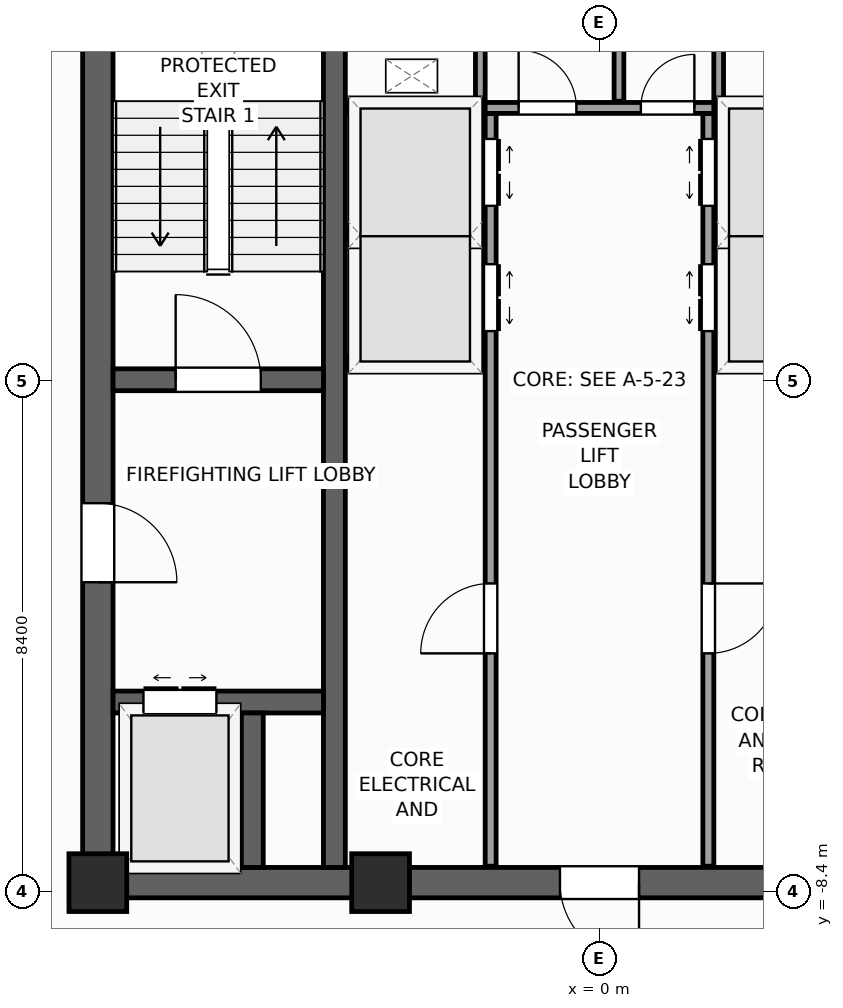
"""IFC4 building model, lengths in metres.
Left out: names, types, materials, properties, quantities, classifications, styles, units other than length and angle.
Written with IfcOpenShell. Run it as: python <this file> out.ifc"""

import sys

from ifc_helpers import new_model, si_unit, direction, frame, frame_2d, origin, origin_2d, place, context, subcontext, project, spatial, rectangle, extrude, source, transform, mapped, element, fill, save


model = new_model("IFC4")
c1 = context("Model", 3, precision=1e-05, world=origin(), true_north=direction((0.0, 1.0)))
c2 = subcontext(c1, "Body", "Model", "MODEL_VIEW")
j1 = project(units=[si_unit("LENGTHUNIT", "METRE"), si_unit("PLANEANGLEUNIT", "RADIAN")], contexts=[c1])
p1 = place(None, origin())
s1 = spatial("IfcSite", under=j1, at=p1, CompositionType="ELEMENT")
p2 = place(p1, origin())
s2 = spatial("IfcBuilding", under=s1, at=p2, CompositionType="ELEMENT")
p3 = place(p2, frame((0.0, 0.0, 236.8)))
s3 = spatial("IfcBuildingStorey", under=s2, at=p3, CompositionType="ELEMENT", Elevation=236.8)
p4 = place(p3, frame((-8.5, -8.25, 0.0), z_axis=(0.0, 0.0, 1.0), x_axis=(1.0, 0.0, 0.0)))
e1 = element("IfcWall", 1, at=p4, inside=s3, PredefinedType="SHEAR", context=c2, shape_type="SweptSolid", body=[
    extrude(rectangle(XDim=17.0, YDim=0.5, at=frame_2d((8.5, 0.0))), origin(), (0.0, 0.0, 1.0), 3.9),
])
p5 = place(p4, frame((7.85, 0.0, 0.0)))
e2 = element("IfcOpeningElement", 2, at=p5, cuts=e1, PredefinedType="OPENING", context=c2, shape_type="SweptSolid", body=[
    extrude(rectangle(XDim=1.3, YDim=2.2, at=frame_2d((0.65, 1.1))), frame((0.0, 0.26, 0.0), z_axis=(0.0, -1.0, 0.0), x_axis=(1.0, 0.0, 0.0)), (0.0, 0.0, 1.0), 0.52),
])
p6 = place(p3, frame((-8.25, -8.0, 0.0), z_axis=(0.0, 0.0, 1.0), x_axis=(0.0, 1.0, 0.0)))
e3 = element("IfcWall", 3, at=p6, inside=s3, PredefinedType="SHEAR", context=c2, shape_type="SweptSolid", body=[
    extrude(rectangle(XDim=16.0, YDim=0.5, at=frame_2d((8.0, 0.0))), origin(), (0.0, 0.0, 1.0), 3.9),
])
p7 = place(p6, frame((4.69, 0.0, 0.0)))
e4 = element("IfcOpeningElement", 4, at=p7, cuts=e3, PredefinedType="OPENING", context=c2, shape_type="SweptSolid", body=[
    extrude(rectangle(XDim=1.3, YDim=2.2, at=frame_2d((0.65, 1.1))), frame((0.0, 0.26, 0.0), z_axis=(0.0, -1.0, 0.0), x_axis=(1.0, 0.0, 0.0)), (0.0, 0.0, 1.0), 0.52),
])
p8 = place(p3, frame((-4.36, -8.0, 0.0), z_axis=(0.0, 0.0, 1.0), x_axis=(0.0, 1.0, 0.0)))
e5 = element("IfcWall", 5, at=p8, inside=s3, PredefinedType="SHEAR", context=c2, shape_type="SweptSolid", body=[
    extrude(rectangle(XDim=16.0, YDim=0.36, at=frame_2d((8.0, 0.0))), origin(), (0.0, 0.0, 1.0), 3.9),
])
p9 = place(p3, frame((-8.0, 0.02, 0.0), z_axis=(0.0, 0.0, 1.0), x_axis=(1.0, 0.0, 0.0)))
e6 = element("IfcWall", 6, at=p9, inside=s3, PredefinedType="SHEAR", context=c2, shape_type="SweptSolid", body=[
    extrude(rectangle(XDim=3.46, YDim=0.36, at=frame_2d((1.73, 0.0))), origin(), (0.0, 0.0, 1.0), 3.9),
])
p10 = place(p9, frame((1.03, 0.0, 0.0)))
e7 = element("IfcOpeningElement", 7, at=p10, cuts=e6, PredefinedType="OPENING", context=c2, shape_type="SweptSolid", body=[
    extrude(rectangle(XDim=1.4, YDim=2.2, at=frame_2d((0.7, 1.1))), frame((0.0, 0.19, 0.0), z_axis=(0.0, -1.0, 0.0), x_axis=(1.0, 0.0, 0.0)), (0.0, 0.0, 1.0), 0.38),
])
p11 = place(p3, frame((-8.0, -5.28, 0.0), z_axis=(0.0, 0.0, 1.0), x_axis=(1.0, 0.0, 0.0)))
e8 = element("IfcWall", 8, at=p11, inside=s3, PredefinedType="SHEAR", context=c2, shape_type="SweptSolid", body=[
    extrude(rectangle(XDim=3.46, YDim=0.36, at=frame_2d((1.73, 0.0))), origin(), (0.0, 0.0, 1.0), 3.9),
])
p12 = place(p11, frame((0.5, 0.0, 0.0)))
e9 = element("IfcOpeningElement", 9, at=p12, cuts=e8, PredefinedType="OPENING", context=c2, shape_type="SweptSolid", body=[
    extrude(rectangle(XDim=1.2, YDim=2.25, at=frame_2d((0.6, 1.125))), frame((0.0, 0.19, 0.0), z_axis=(0.0, -1.0, 0.0), x_axis=(1.0, 0.0, 0.0)), (0.0, 0.0, 1.0), 0.38),
])
p13 = place(p3, frame((-5.71, -8.0, 0.0), z_axis=(0.0, 0.0, 1.0), x_axis=(0.0, 1.0, 0.0)))
e10 = element("IfcWall", 10, at=p13, inside=s3, PredefinedType="SHEAR", context=c2, shape_type="SweptSolid", body=[
    extrude(rectangle(XDim=2.54, YDim=0.36, at=frame_2d((1.27, 0.0))), origin(), (0.0, 0.0, 1.0), 3.9),
])
m1 = source(origin(), c2, "Body", "SweptSolid", [
    extrude(rectangle(XDim=0.95, YDim=0.95, at=origin_2d()), origin(), (0.0, 0.0, 1.0), 3.9),
])
for number, where, z_axis, x_axis in (
    (11, (-8.25, -8.25, 0.0), (0.0, 0.0, 1.0), (1.0, 0.0, 0.0)),
    (12, (-3.6, -8.25, 0.0), (0.0, 0.0, 1.0), (1.0, 0.0, 0.0)),
):
    element("IfcColumn", number, at=place(p3, frame(where, z_axis=z_axis, x_axis=x_axis)), inside=s3, PredefinedType="PILASTER", context=c2, shape_type="MappedRepresentation", body=[
        mapped(m1, transform((0.0, 0.0, 0.0), scale=1.0)),
    ])
p14 = place(p3, frame((-6.733, 29.154, 0.0), z_axis=(0.0, 0.0, 1.0), x_axis=(-0.629325378072, -0.77714192302, 0.0)))
e13 = element("IfcWall", 13, at=p14, inside=s3, PredefinedType="STANDARD", context=c2, shape_type="SweptSolid", body=[
    extrude(rectangle(XDim=36.84, YDim=0.34, at=frame_2d((18.42, 0.0))), origin(), (0.0, 0.0, 1.0), 2.96),
])
p15 = place(p14, frame((12.295, 0.0, 0.0)))
e14 = element("IfcOpeningElement", 14, at=p15, cuts=e13, PredefinedType="OPENING", context=c2, shape_type="SweptSolid", body=[
    extrude(rectangle(XDim=1.05, YDim=2.25, at=frame_2d((0.525, 1.125))), frame((0.0, 0.18, 0.0), z_axis=(0.0, -1.0, 0.0), x_axis=(1.0, 0.0, 0.0)), (0.0, 0.0, 1.0), 0.36),
])
p16 = place(p14, frame((3.721, 0.0, 0.48)))
e15 = element("IfcOpeningElement", 15, at=p16, cuts=e13, PredefinedType="OPENING", context=c2, shape_type="SweptSolid", body=[
    extrude(rectangle(XDim=1.4, YDim=2.4, at=frame_2d((0.7, 1.2))), frame((0.0, 0.18, 0.0), z_axis=(0.0, -1.0, 0.0), x_axis=(1.0, 0.0, 0.0)), (0.0, 0.0, 1.0), 0.36),
])
p17 = place(p14, frame((7.559, 0.0, 0.58)))
e16 = element("IfcOpeningElement", 16, at=p17, cuts=e13, PredefinedType="OPENING", context=c2, shape_type="SweptSolid", body=[
    extrude(rectangle(XDim=1.75, YDim=2.3, at=frame_2d((0.875, 1.15))), frame((0.0, 0.18, 0.0), z_axis=(0.0, -1.0, 0.0), x_axis=(1.0, 0.0, 0.0)), (0.0, 0.0, 1.0), 0.36),
])
p18 = place(p14, frame((16.058, 0.0, 0.58)))
e17 = element("IfcOpeningElement", 17, at=p18, cuts=e13, PredefinedType="OPENING", context=c2, shape_type="SweptSolid", body=[
    extrude(rectangle(XDim=1.75, YDim=2.3, at=frame_2d((0.875, 1.15))), frame((0.0, 0.18, 0.0), z_axis=(0.0, -1.0, 0.0), x_axis=(1.0, 0.0, 0.0)), (0.0, 0.0, 1.0), 0.36),
])
p19 = place(p14, frame((24.176, 0.0, 0.58)))
e18 = element("IfcOpeningElement", 18, at=p19, cuts=e13, PredefinedType="OPENING", context=c2, shape_type="SweptSolid", body=[
    extrude(rectangle(XDim=1.75, YDim=2.3, at=frame_2d((0.875, 1.15))), frame((0.0, 0.18, 0.0), z_axis=(0.0, -1.0, 0.0), x_axis=(1.0, 0.0, 0.0)), (0.0, 0.0, 1.0), 0.36),
])
p20 = place(p14, frame((30.982, 0.0, 0.48)))
e19 = element("IfcOpeningElement", 19, at=p20, cuts=e13, PredefinedType="OPENING", context=c2, shape_type="SweptSolid", body=[
    extrude(rectangle(XDim=1.4, YDim=2.4, at=frame_2d((0.7, 1.2))), frame((0.0, 0.18, 0.0), z_axis=(0.0, -1.0, 0.0), x_axis=(1.0, 0.0, 0.0)), (0.0, 0.0, 1.0), 0.36),
])
p21 = place(p3, frame((-29.154, -6.733, 0.0), z_axis=(0.0, 0.0, 1.0), x_axis=(0.77714192302, -0.629325378072, 0.0)))
e20 = element("IfcWall", 20, at=p21, inside=s3, PredefinedType="STANDARD", context=c2, shape_type="SweptSolid", body=[
    extrude(rectangle(XDim=36.84, YDim=0.34, at=frame_2d((18.42, 0.0))), origin(), (0.0, 0.0, 1.0), 2.96),
])
p22 = place(p21, frame((3.721, 0.0, 0.48)))
e21 = element("IfcOpeningElement", 21, at=p22, cuts=e20, PredefinedType="OPENING", context=c2, shape_type="SweptSolid", body=[
    extrude(rectangle(XDim=1.4, YDim=2.4, at=frame_2d((0.7, 1.2))), frame((0.0, 0.18, 0.0), z_axis=(0.0, -1.0, 0.0), x_axis=(1.0, 0.0, 0.0)), (0.0, 0.0, 1.0), 0.36),
])
p23 = place(p21, frame((9.809, 0.0, 0.58)))
e22 = element("IfcOpeningElement", 22, at=p23, cuts=e20, PredefinedType="OPENING", context=c2, shape_type="SweptSolid", body=[
    extrude(rectangle(XDim=1.75, YDim=2.3, at=frame_2d((0.875, 1.15))), frame((0.0, 0.18, 0.0), z_axis=(0.0, -1.0, 0.0), x_axis=(1.0, 0.0, 0.0)), (0.0, 0.0, 1.0), 0.36),
])
p24 = place(p21, frame((16.058, 0.0, 0.58)))
e23 = element("IfcOpeningElement", 23, at=p24, cuts=e20, PredefinedType="OPENING", context=c2, shape_type="SweptSolid", body=[
    extrude(rectangle(XDim=1.75, YDim=2.3, at=frame_2d((0.875, 1.15))), frame((0.0, 0.18, 0.0), z_axis=(0.0, -1.0, 0.0), x_axis=(1.0, 0.0, 0.0)), (0.0, 0.0, 1.0), 0.36),
])
p25 = place(p21, frame((24.176, 0.0, 0.58)))
e24 = element("IfcOpeningElement", 24, at=p25, cuts=e20, PredefinedType="OPENING", context=c2, shape_type="SweptSolid", body=[
    extrude(rectangle(XDim=1.75, YDim=2.3, at=frame_2d((0.875, 1.15))), frame((0.0, 0.18, 0.0), z_axis=(0.0, -1.0, 0.0), x_axis=(1.0, 0.0, 0.0)), (0.0, 0.0, 1.0), 0.36),
])
p26 = place(p21, frame((32.482, 0.0, 0.48)))
e25 = element("IfcOpeningElement", 25, at=p26, cuts=e20, PredefinedType="OPENING", context=c2, shape_type="SweptSolid", body=[
    extrude(rectangle(XDim=1.4, YDim=2.4, at=frame_2d((0.7, 1.2))), frame((0.0, 0.18, 0.0), z_axis=(0.0, -1.0, 0.0), x_axis=(1.0, 0.0, 0.0)), (0.0, 0.0, 1.0), 0.36),
])
p27 = place(p3, frame((-1.79, -7.98, 0.0), z_axis=(0.0, 0.0, 1.0), x_axis=(0.0, 1.0, 0.0)))
e26 = element("IfcWall", 26, at=p27, inside=s3, PredefinedType="PARTITIONING", context=c2, shape_type="SweptSolid", body=[
    extrude(rectangle(XDim=12.38, YDim=0.18, at=frame_2d((6.19, 0.0))), origin(), (0.0, 0.0, 1.0), 3.66),
])
p28 = place(p27, frame((8.8, 0.0, 0.0)))
e27 = element("IfcOpeningElement", 27, at=p28, cuts=e26, PredefinedType="OPENING", context=c2, shape_type="SweptSolid", body=[
    extrude(rectangle(XDim=1.1, YDim=2.2, at=frame_2d((0.55, 1.1))), frame((0.0, 0.1, 0.0), z_axis=(0.0, -1.0, 0.0), x_axis=(1.0, 0.0, 0.0)), (0.0, 0.0, 1.0), 0.2),
])
p29 = place(p27, frame((10.86, 0.0, 0.0)))
e28 = element("IfcOpeningElement", 28, at=p29, cuts=e26, PredefinedType="OPENING", context=c2, shape_type="SweptSolid", body=[
    extrude(rectangle(XDim=1.1, YDim=2.2, at=frame_2d((0.55, 1.1))), frame((0.0, 0.1, 0.0), z_axis=(0.0, -1.0, 0.0), x_axis=(1.0, 0.0, 0.0)), (0.0, 0.0, 1.0), 0.2),
])
p30 = place(p27, frame((3.5, 0.0, 0.0)))
e29 = element("IfcOpeningElement", 29, at=p30, cuts=e26, PredefinedType="OPENING", context=c2, shape_type="SweptSolid", body=[
    extrude(rectangle(XDim=1.15, YDim=2.25, at=frame_2d((0.575, 1.125))), frame((0.0, 0.1, 0.0), z_axis=(0.0, -1.0, 0.0), x_axis=(1.0, 0.0, 0.0)), (0.0, 0.0, 1.0), 0.2),
])
p31 = place(p3, frame((1.79, -7.98, 0.0), z_axis=(0.0, 0.0, 1.0), x_axis=(0.0, 1.0, 0.0)))
e30 = element("IfcWall", 30, at=p31, inside=s3, PredefinedType="PARTITIONING", context=c2, shape_type="SweptSolid", body=[
    extrude(rectangle(XDim=12.38, YDim=0.18, at=frame_2d((6.19, 0.0))), origin(), (0.0, 0.0, 1.0), 3.66),
])
p32 = place(p31, frame((8.8, 0.0, 0.0)))
e31 = element("IfcOpeningElement", 31, at=p32, cuts=e30, PredefinedType="OPENING", context=c2, shape_type="SweptSolid", body=[
    extrude(rectangle(XDim=1.1, YDim=2.2, at=frame_2d((0.55, 1.1))), frame((0.0, 0.1, 0.0), z_axis=(0.0, -1.0, 0.0), x_axis=(1.0, 0.0, 0.0)), (0.0, 0.0, 1.0), 0.2),
])
p33 = place(p31, frame((10.86, 0.0, 0.0)))
e32 = element("IfcOpeningElement", 32, at=p33, cuts=e30, PredefinedType="OPENING", context=c2, shape_type="SweptSolid", body=[
    extrude(rectangle(XDim=1.1, YDim=2.2, at=frame_2d((0.55, 1.1))), frame((0.0, 0.1, 0.0), z_axis=(0.0, -1.0, 0.0), x_axis=(1.0, 0.0, 0.0)), (0.0, 0.0, 1.0), 0.2),
])
p34 = place(p31, frame((3.5, 0.0, 0.0)))
e33 = element("IfcOpeningElement", 33, at=p34, cuts=e30, PredefinedType="OPENING", context=c2, shape_type="SweptSolid", body=[
    extrude(rectangle(XDim=1.15, YDim=2.25, at=frame_2d((0.575, 1.125))), frame((0.0, 0.1, 0.0), z_axis=(0.0, -1.0, 0.0), x_axis=(1.0, 0.0, 0.0)), (0.0, 0.0, 1.0), 0.2),
])
p35 = place(p3, frame((-1.88, 4.49, 0.0), z_axis=(0.0, 0.0, 1.0), x_axis=(1.0, 0.0, 0.0)))
e34 = element("IfcWall", 34, at=p35, inside=s3, PredefinedType="PARTITIONING", context=c2, shape_type="SweptSolid", body=[
    extrude(rectangle(XDim=3.76, YDim=0.18, at=frame_2d((1.88, 0.0))), origin(), (0.0, 0.0, 1.0), 3.66),
])
p36 = place(p35, frame((0.55, 0.0, 0.0)))
e35 = element("IfcOpeningElement", 35, at=p36, cuts=e34, PredefinedType="OPENING", context=c2, shape_type="SweptSolid", body=[
    extrude(rectangle(XDim=0.95, YDim=2.1, at=frame_2d((0.475, 1.05))), frame((0.0, 0.1, 0.0), z_axis=(0.0, -1.0, 0.0), x_axis=(1.0, 0.0, 0.0)), (0.0, 0.0, 1.0), 0.2),
])
p37 = place(p35, frame((2.56, 0.0, 0.0)))
e36 = element("IfcOpeningElement", 36, at=p37, cuts=e34, PredefinedType="OPENING", context=c2, shape_type="SweptSolid", body=[
    extrude(rectangle(XDim=0.88, YDim=2.1, at=frame_2d((0.44, 1.05))), frame((0.0, 0.1, 0.0), z_axis=(0.0, -1.0, 0.0), x_axis=(1.0, 0.0, 0.0)), (0.0, 0.0, 1.0), 0.2),
])
for number, where, z_axis, x_axis in (
    (37, (-4.17, 0.3, 0.0), (0.0, 0.0, 1.0), (1.0, 0.0, 0.0)),
    (38, (1.89, 0.3, 0.0), (0.0, 0.0, 1.0), (1.0, 0.0, 0.0)),
    (39, (-4.17, 4.49, 0.0), (0.0, 0.0, 1.0), (1.0, 0.0, 0.0)),
    (40, (1.89, 4.49, 0.0), (0.0, 0.0, 1.0), (1.0, 0.0, 0.0)),
):
    element("IfcWall", number, at=place(p3, frame(where, z_axis=z_axis, x_axis=x_axis)), inside=s3, PredefinedType="PARTITIONING", context=c2, shape_type="SweptSolid", body=[
        extrude(rectangle(XDim=2.28, YDim=0.18, at=frame_2d((1.14, 0.0))), origin(), (0.0, 0.0, 1.0), 3.66),
    ])
for number, where, z_axis, x_axis in (
    (41, (-4.16, 2.4, 0.0), (0.0, 0.0, 1.0), (1.0, 0.0, 0.0)),
    (42, (1.9, 2.4, 0.0), (0.0, 0.0, 1.0), (1.0, 0.0, 0.0)),
):
    element("IfcWall", number, at=place(p3, frame(where, z_axis=z_axis, x_axis=x_axis)), inside=s3, PredefinedType="PARTITIONING", context=c2, shape_type="SweptSolid", body=[
        extrude(rectangle(XDim=2.26, YDim=0.12, at=frame_2d((1.13, 0.0))), origin(), (0.0, 0.0, 1.0), 3.66),
    ])
for number, where, z_axis, x_axis in (
    (43, (-1.96, 4.58, 0.0), (0.0, 0.0, 1.0), (0.0, 1.0, 0.0)),
    (44, (1.96, 4.58, 0.0), (0.0, 0.0, 1.0), (0.0, 1.0, 0.0)),
):
    element("IfcWall", number, at=place(p3, frame(where, z_axis=z_axis, x_axis=x_axis)), inside=s3, PredefinedType="PARTITIONING", context=c2, shape_type="SweptSolid", body=[
        extrude(rectangle(XDim=3.4, YDim=0.16, at=frame_2d((1.7, 0.0))), origin(), (0.0, 0.0, 1.0), 3.66),
    ])
p38 = place(p3, frame((0.32, 4.6, 0.0), z_axis=(0.0, 0.0, 1.0), x_axis=(0.0, 1.0, 0.0)))
e45 = element("IfcWall", 45, at=p38, inside=s3, PredefinedType="PARTITIONING", context=c2, shape_type="SweptSolid", body=[
    extrude(rectangle(XDim=1.95, YDim=0.16, at=frame_2d((0.975, 0.0))), origin(), (0.0, 0.0, 1.0), 3.66),
])
m2 = source(origin(), c2, "Body", "SweptSolid", [
    extrude(rectangle(XDim=1.4, YDim=2.2, at=frame_2d((0.7, 1.1))), frame((0.0, 0.025, 0.0), z_axis=(0.0, -1.0, 0.0), x_axis=(1.0, 0.0, 0.0)), (0.0, 0.0, 1.0), 0.05),
])
p39 = place(p10, origin())
e46 = element("IfcDoor", 46, at=p39, inside=s3, OperationType="SINGLE_SWING_LEFT", PredefinedType="DOOR", context=c2, shape_type="MappedRepresentation", body=[
    mapped(m2, transform((0.0, 0.0, 0.0), scale=1.0)),
])
fill(e7, e46)
m3 = source(origin(), c2, "Body", "SweptSolid", [
    extrude(rectangle(XDim=1.3, YDim=2.2, at=frame_2d((0.65, 1.1))), frame((0.0, 0.025, 0.0), z_axis=(0.0, -1.0, 0.0), x_axis=(1.0, 0.0, 0.0)), (0.0, 0.0, 1.0), 0.05),
])
p40 = place(p7, frame((1.3, 0.0, 0.0), z_axis=(0.0, 0.0, 1.0), x_axis=(-1.0, 0.0, 0.0)))
e47 = element("IfcDoor", 47, at=p40, inside=s3, OperationType="SINGLE_SWING_LEFT", PredefinedType="DOOR", context=c2, shape_type="MappedRepresentation", body=[
    mapped(m3, transform((0.0, 0.0, 0.0), scale=1.0)),
])
fill(e4, e47)
p41 = place(p5, frame((1.3, 0.0, 0.0), z_axis=(0.0, 0.0, 1.0), x_axis=(-1.0, 0.0, 0.0)))
e48 = element("IfcDoor", 48, at=p41, inside=s3, OperationType="SINGLE_SWING_RIGHT", PredefinedType="DOOR", context=c2, shape_type="MappedRepresentation", body=[
    mapped(m3, transform((0.0, 0.0, 0.0), scale=1.0)),
])
fill(e2, e48)
m4 = source(origin(), c2, "Body", "SweptSolid", [
    extrude(rectangle(XDim=1.2, YDim=2.25, at=frame_2d((0.6, 1.125))), frame((0.0, 0.025, 0.0), z_axis=(0.0, -1.0, 0.0), x_axis=(1.0, 0.0, 0.0)), (0.0, 0.0, 1.0), 0.05),
])
p42 = place(p12, origin())
e49 = element("IfcDoor", 49, at=p42, inside=s3, OperationType="DOUBLE_DOOR_SLIDING", PredefinedType="DOOR", context=c2, shape_type="MappedRepresentation", body=[
    mapped(m4, transform((0.0, 0.0, 0.0), scale=1.0)),
])
fill(e9, e49)
m5 = source(origin(), c2, "Body", "SweptSolid", [
    extrude(rectangle(XDim=1.1, YDim=2.2, at=frame_2d((0.55, 1.1))), frame((0.0, 0.025, 0.0), z_axis=(0.0, -1.0, 0.0), x_axis=(1.0, 0.0, 0.0)), (0.0, 0.0, 1.0), 0.05),
])
p43 = place(p28, frame((1.1, 0.0, 0.0), z_axis=(0.0, 0.0, 1.0), x_axis=(-1.0, 0.0, 0.0)))
e50 = element("IfcDoor", 50, at=p43, inside=s3, OperationType="DOUBLE_DOOR_SLIDING", PredefinedType="DOOR", context=c2, shape_type="MappedRepresentation", body=[
    mapped(m5, transform((0.0, 0.0, 0.0), scale=1.0)),
])
fill(e27, e50)
p44 = place(p29, frame((1.1, 0.0, 0.0), z_axis=(0.0, 0.0, 1.0), x_axis=(-1.0, 0.0, 0.0)))
e51 = element("IfcDoor", 51, at=p44, inside=s3, OperationType="DOUBLE_DOOR_SLIDING", PredefinedType="DOOR", context=c2, shape_type="MappedRepresentation", body=[
    mapped(m5, transform((0.0, 0.0, 0.0), scale=1.0)),
])
fill(e28, e51)
p45 = place(p32, origin())
e52 = element("IfcDoor", 52, at=p45, inside=s3, OperationType="DOUBLE_DOOR_SLIDING", PredefinedType="DOOR", context=c2, shape_type="MappedRepresentation", body=[
    mapped(m5, transform((0.0, 0.0, 0.0), scale=1.0)),
])
fill(e31, e52)
p46 = place(p33, origin())
e53 = element("IfcDoor", 53, at=p46, inside=s3, OperationType="DOUBLE_DOOR_SLIDING", PredefinedType="DOOR", context=c2, shape_type="MappedRepresentation", body=[
    mapped(m5, transform((0.0, 0.0, 0.0), scale=1.0)),
])
fill(e32, e53)
m6 = source(origin(), c2, "Body", "SweptSolid", [
    extrude(rectangle(XDim=1.15, YDim=2.25, at=frame_2d((0.575, 1.125))), frame((0.0, 0.025, 0.0), z_axis=(0.0, -1.0, 0.0), x_axis=(1.0, 0.0, 0.0)), (0.0, 0.0, 1.0), 0.05),
])
p47 = place(p30, origin())
e54 = element("IfcDoor", 54, at=p47, inside=s3, OperationType="SINGLE_SWING_LEFT", PredefinedType="DOOR", context=c2, shape_type="MappedRepresentation", body=[
    mapped(m6, transform((0.0, 0.0, 0.0), scale=1.0)),
])
fill(e29, e54)
p48 = place(p34, frame((1.15, 0.0, 0.0), z_axis=(0.0, 0.0, 1.0), x_axis=(-1.0, 0.0, 0.0)))
e55 = element("IfcDoor", 55, at=p48, inside=s3, OperationType="SINGLE_SWING_RIGHT", PredefinedType="DOOR", context=c2, shape_type="MappedRepresentation", body=[
    mapped(m6, transform((0.0, 0.0, 0.0), scale=1.0)),
])
fill(e33, e55)
m7 = source(origin(), c2, "Body", "SweptSolid", [
    extrude(rectangle(XDim=0.95, YDim=2.1, at=frame_2d((0.475, 1.05))), frame((0.0, 0.025, 0.0), z_axis=(0.0, -1.0, 0.0), x_axis=(1.0, 0.0, 0.0)), (0.0, 0.0, 1.0), 0.05),
])
p49 = place(p36, origin())
e56 = element("IfcDoor", 56, at=p49, inside=s3, OperationType="SINGLE_SWING_LEFT", PredefinedType="DOOR", context=c2, shape_type="MappedRepresentation", body=[
    mapped(m7, transform((0.0, 0.0, 0.0), scale=1.0)),
])
fill(e35, e56)
m8 = source(origin(), c2, "Body", "SweptSolid", [
    extrude(rectangle(XDim=0.88, YDim=2.1, at=frame_2d((0.44, 1.05))), frame((0.0, 0.025, 0.0), z_axis=(0.0, -1.0, 0.0), x_axis=(1.0, 0.0, 0.0)), (0.0, 0.0, 1.0), 0.05),
])
p50 = place(p37, origin())
e57 = element("IfcDoor", 57, at=p50, inside=s3, OperationType="SINGLE_SWING_RIGHT", PredefinedType="DOOR", context=c2, shape_type="MappedRepresentation", body=[
    mapped(m8, transform((0.0, 0.0, 0.0), scale=1.0)),
])
fill(e36, e57)
save(model, sys.argv[1])
